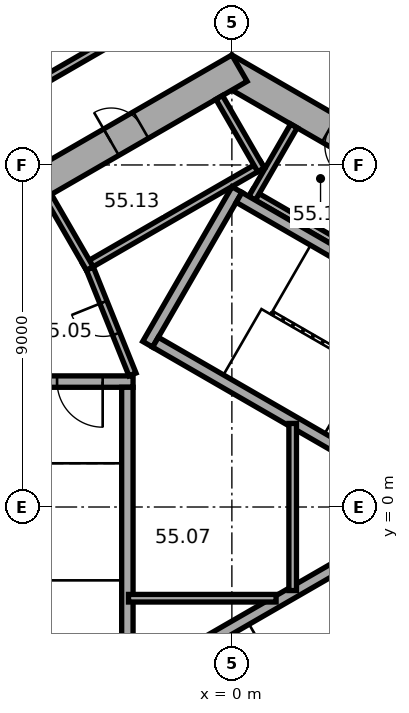
"""IFC4 building model, lengths in metres.
Left out: names, types, materials, properties, quantities, classifications, styles, units other than length and angle.
Written with IfcOpenShell. Run it as: python <this file> out.ifc"""

import sys

from ifc_helpers import new_model, si_unit, direction, frame, frame_2d, origin, place, context, subcontext, project, spatial, rectangle, extrude, element, fill, save


model = new_model("IFC4")
c1 = context("Model", 3, precision=1e-05, world=origin(), true_north=direction((0.0, 1.0)))
c2 = subcontext(c1, "Body", "Model", "MODEL_VIEW")
j1 = project(units=[si_unit("LENGTHUNIT", "METRE"), si_unit("PLANEANGLEUNIT", "RADIAN")], contexts=[c1])
p1 = place(None, origin())
s1 = spatial("IfcSite", under=j1, at=p1, CompositionType="ELEMENT")
p2 = place(p1, origin())
s2 = spatial("IfcBuilding", under=s1, at=p2, CompositionType="ELEMENT")
p3 = place(p2, frame((0.0, 0.0, 225.4)))
s3 = spatial("IfcBuildingStorey", under=s2, at=p3, CompositionType="ELEMENT", Elevation=225.4)
p4 = place(p3, frame((10.1, 5.6, 0.0), z_axis=(0.0, 0.0, 1.0), x_axis=(-0.866023897231, 0.500002609418, 0.0)))
e1 = element("IfcWall", 1, at=p4, inside=s3, PredefinedType="SHEAR", context=c2, shape_type="SweptSolid", body=[
    extrude(rectangle(XDim=11.894, YDim=0.8, at=frame_2d((5.947, 0.0))), origin(), (0.0, 0.0, 1.0), 3.7),
])
p5 = place(p4, frame((3.897, 0.0, 0.0)))
e2 = element("IfcOpeningElement", 2, at=p5, cuts=e1, PredefinedType="OPENING", context=c2, shape_type="SweptSolid", body=[
    extrude(rectangle(XDim=0.9, YDim=2.1, at=frame_2d((0.45, 1.05))), frame((0.0, 0.41, 0.0), z_axis=(0.0, -1.0, 0.0), x_axis=(1.0, 0.0, 0.0)), (0.0, 0.0, 1.0), 0.82),
])
p6 = place(p4, frame((7.797, 0.0, 0.0)))
e3 = element("IfcOpeningElement", 3, at=p6, cuts=e1, PredefinedType="OPENING", context=c2, shape_type="SweptSolid", body=[
    extrude(rectangle(XDim=0.9, YDim=2.1, at=frame_2d((0.45, 1.05))), frame((0.0, 0.41, 0.0), z_axis=(0.0, -1.0, 0.0), x_axis=(1.0, 0.0, 0.0)), (0.0, 0.0, 1.0), 0.82),
])
p7 = place(p3, frame((0.2, 11.547, 0.0), z_axis=(0.0, 0.0, 1.0), x_axis=(-0.866023897231, -0.500002609418, 0.0)))
e4 = element("IfcWall", 4, at=p7, inside=s3, PredefinedType="SHEAR", context=c2, shape_type="SweptSolid", body=[
    extrude(rectangle(XDim=11.894, YDim=0.8, at=frame_2d((5.947, 0.0))), origin(), (0.0, 0.0, 1.0), 3.7),
])
p8 = place(p7, frame((6.147, 0.0, 0.0)))
e5 = element("IfcOpeningElement", 5, at=p8, cuts=e4, PredefinedType="OPENING", context=c2, shape_type="SweptSolid", body=[
    extrude(rectangle(XDim=1.5, YDim=2.1, at=frame_2d((0.75, 1.05))), frame((0.0, 0.41, 0.0), z_axis=(0.0, -1.0, 0.0), x_axis=(1.0, 0.0, 0.0)), (0.0, 0.0, 1.0), 0.82),
])
p9 = place(p7, frame((2.997, 0.0, 0.0)))
e6 = element("IfcOpeningElement", 6, at=p9, cuts=e4, PredefinedType="OPENING", context=c2, shape_type="SweptSolid", body=[
    extrude(rectangle(XDim=0.9, YDim=2.1, at=frame_2d((0.45, 1.05))), frame((0.0, 0.41, 0.0), z_axis=(0.0, -1.0, 0.0), x_axis=(1.0, 0.0, 0.0)), (0.0, 0.0, 1.0), 0.82),
])
p10 = place(p3, frame((7.424, 4.259, 0.0), z_axis=(0.0, 0.0, 1.0), x_axis=(-0.866026010844, 0.49999894854, 0.0)))
e7 = element("IfcWall", 7, at=p10, inside=s3, PredefinedType="PARTITIONING", context=c2, shape_type="SweptSolid", body=[
    extrude(rectangle(XDim=8.0, YDim=0.2, at=frame_2d((4.0, 0.0))), origin(), (0.0, 0.0, 1.0), 3.42),
])
p11 = place(p3, frame((0.532, 8.122, 0.0), z_axis=(0.0, 0.0, 1.0), x_axis=(0.500077893725, 0.86598042715, 0.0)))
e8 = element("IfcWall", 8, at=p11, inside=s3, PredefinedType="PARTITIONING", context=c2, shape_type="SweptSolid", body=[
    extrude(rectangle(XDim=2.2, YDim=0.2, at=frame_2d((1.1, 0.0))), origin(), (0.0, 0.0, 1.0), 3.42),
])
p12 = place(p3, frame((0.803, 9.009, 0.0), z_axis=(0.0, 0.0, 1.0), x_axis=(-0.866028230842, -0.499995103361, 0.0)))
e9 = element("IfcWall", 9, at=p12, inside=s3, PredefinedType="PARTITIONING", context=c2, shape_type="SweptSolid", body=[
    extrude(rectangle(XDim=5.4, YDim=0.2, at=frame_2d((2.7, 0.0))), origin(), (0.0, 0.0, 1.0), 3.42),
])
p13 = place(p3, frame((0.767, 8.872, 0.0), z_axis=(0.0, 0.0, 1.0), x_axis=(-0.499994660107, 0.866028486751, 0.0)))
e10 = element("IfcWall", 10, at=p13, inside=s3, PredefinedType="PARTITIONING", context=c2, shape_type="SweptSolid", body=[
    extrude(rectangle(XDim=2.2, YDim=0.2, at=frame_2d((1.1, 0.0))), origin(), (0.0, 0.0, 1.0), 3.42),
])
p14 = place(p3, frame((-3.737, 6.272, 0.0), z_axis=(0.0, 0.0, 1.0), x_axis=(-0.50002983664, 0.866008176907, 0.0)))
e11 = element("IfcWall", 11, at=p14, inside=s3, PredefinedType="PARTITIONING", context=c2, shape_type="SweptSolid", body=[
    extrude(rectangle(XDim=2.2, YDim=0.2, at=frame_2d((1.1, 0.0))), origin(), (0.0, 0.0, 1.0), 3.42),
])
p15 = place(p3, frame((-2.216, 4.282, 0.0), z_axis=(0.0, 0.0, 1.0), x_axis=(0.499977259774, 0.866038532462, 0.0)))
e12 = element("IfcWall", 12, at=p15, inside=s3, PredefinedType="SHEAR", context=c2, shape_type="SweptSolid", body=[
    extrude(rectangle(XDim=4.7, YDim=0.3, at=frame_2d((2.35, 0.0))), origin(), (0.0, 0.0, 1.0), 3.42),
])
for number, where, z_axis, x_axis in (
    (13, (4.103, 0.807, 0.0), (0.0, 0.0, 1.0), (-0.866, 0.5, 0.0)),
    (14, (6.303, 4.617, 0.0), (0.0, 0.0, 1.0), (-0.866, 0.5, 0.0)),
):
    element("IfcWall", number, at=place(p3, frame(where, z_axis=z_axis, x_axis=x_axis)), inside=s3, PredefinedType="SHEAR", context=c2, shape_type="SweptSolid", body=[
        extrude(rectangle(XDim=7.06, YDim=0.3, at=frame_2d((3.53, 0.0))), origin(), (0.0, 0.0, 1.0), 3.42),
    ])
p16 = place(p3, frame((-2.6, 3.3, 0.0), z_axis=(0.0, 0.0, 1.0), x_axis=(-1.0, 0.0, 0.0)))
e15 = element("IfcWall", 15, at=p16, inside=s3, PredefinedType="SHEAR", context=c2, shape_type="SweptSolid", body=[
    extrude(rectangle(XDim=4.7, YDim=0.3, at=frame_2d((2.35, 0.0))), origin(), (0.0, 0.0, 1.0), 3.42),
])
p17 = place(p16, frame((0.8, 0.0, 0.0)))
e16 = element("IfcOpeningElement", 16, at=p17, cuts=e15, PredefinedType="OPENING", context=c2, shape_type="SweptSolid", body=[
    extrude(rectangle(XDim=1.2, YDim=2.1, at=frame_2d((0.6, 1.05))), frame((0.0, 0.16, 0.0), z_axis=(0.0, -1.0, 0.0), x_axis=(1.0, 0.0, 0.0)), (0.0, 0.0, 1.0), 0.32),
])
p18 = place(p3, frame((-2.75, 3.15, 0.0), z_axis=(0.0, 0.0, 1.0), x_axis=(0.0, -1.0, 0.0)))
e17 = element("IfcWall", 17, at=p18, inside=s3, PredefinedType="SHEAR", context=c2, shape_type="SweptSolid", body=[
    extrude(rectangle(XDim=7.06, YDim=0.3, at=frame_2d((3.53, 0.0))), origin(), (0.0, 0.0, 1.0), 3.42),
])
p19 = place(p3, frame((-1.353, -3.957, 0.0), z_axis=(0.0, 0.0, 1.0), x_axis=(0.866027801685, 0.499995846692, 0.0)))
e18 = element("IfcWall", 18, at=p19, inside=s3, PredefinedType="SHEAR", context=c2, shape_type="SweptSolid", body=[
    extrude(rectangle(XDim=7.06, YDim=0.3, at=frame_2d((3.53, 0.0))), origin(), (0.0, 0.0, 1.0), 3.42),
])
p20 = place(p3, frame((-2.615, 3.487, 0.0), z_axis=(0.0, 0.0, 1.0), x_axis=(-0.373576831041, 0.92759924068, 0.0)))
e19 = element("IfcWall", 19, at=p20, inside=s3, PredefinedType="PARTITIONING", context=c2, shape_type="SweptSolid", body=[
    extrude(rectangle(XDim=3.002, YDim=0.2, at=frame_2d((1.501, 0.0))), origin(), (0.0, 0.0, 1.0), 3.42),
])
p21 = place(p20, frame((1.15, 0.0, 0.0)))
e20 = element("IfcOpeningElement", 20, at=p21, cuts=e19, PredefinedType="OPENING", context=c2, shape_type="SweptSolid", body=[
    extrude(rectangle(XDim=0.9, YDim=2.1, at=frame_2d((0.45, 1.05))), frame((0.0, 0.11, 0.0), z_axis=(0.0, -1.0, 0.0), x_axis=(1.0, 0.0, 0.0)), (0.0, 0.0, 1.0), 0.22),
])
p22 = place(p3, frame((-2.72, -2.4, 0.0), z_axis=(0.0, 0.0, 1.0), x_axis=(1.0, 0.0, 0.0)))
e21 = element("IfcWall", 21, at=p22, inside=s3, PredefinedType="PARTITIONING", context=c2, shape_type="SweptSolid", body=[
    extrude(rectangle(XDim=3.883, YDim=0.2, at=frame_2d((1.941, 0.0))), origin(), (0.0, 0.0, 1.0), 3.42),
])
p23 = place(p3, frame((1.6, -2.198, 0.0), z_axis=(0.0, 0.0, 1.0), x_axis=(0.0, 1.0, 0.0)))
e22 = element("IfcWall", 22, at=p23, inside=s3, PredefinedType="PARTITIONING", context=c2, shape_type="SweptSolid", body=[
    extrude(rectangle(XDim=4.397, YDim=0.2, at=frame_2d((2.198, 0.0))), origin(), (0.0, 0.0, 1.0), 3.42),
])
p24 = place(p3, frame((-1.167, 13.414, 0.0), z_axis=(0.0, 0.0, 1.0), x_axis=(-0.866023347809, -0.500003561037, 0.0)))
e23 = element("IfcWall", 23, at=p24, inside=s3, PredefinedType="PARTITIONING", context=c2, shape_type="SweptSolid", body=[
    extrude(rectangle(XDim=4.661, YDim=0.2, at=frame_2d((2.331, 0.0))), origin(), (0.0, 0.0, 1.0), 3.42),
])
p25 = place(p3, frame((8.721, 9.052, 0.0), z_axis=(0.0, 0.0, 1.0), x_axis=(-0.866028125821, 0.499995285264, 0.0)))
e24 = element("IfcWall", 24, at=p25, inside=s3, PredefinedType="PARTITIONING", context=c2, shape_type="SweptSolid", body=[
    extrude(rectangle(XDim=8.934, YDim=0.2, at=frame_2d((4.467, 0.0))), origin(), (0.0, 0.0, 1.0), 3.42),
])
p26 = place(p25, frame((5.05, 0.0, 0.0)))
e25 = element("IfcOpeningElement", 25, at=p26, cuts=e24, PredefinedType="OPENING", context=c2, shape_type="SweptSolid", body=[
    extrude(rectangle(XDim=1.0, YDim=2.1, at=frame_2d((0.5, 1.05))), frame((0.0, 0.11, 0.0), z_axis=(0.0, -1.0, 0.0), x_axis=(1.0, 0.0, 0.0)), (0.0, 0.0, 1.0), 0.22),
])
p27 = place(p17, origin())
e26 = element("IfcDoor", 26, at=p27, inside=s3, OperationType="SINGLE_SWING_RIGHT", PredefinedType="DOOR", context=c2, shape_type="SweptSolid", body=[
    extrude(rectangle(XDim=1.2, YDim=2.1, at=frame_2d((0.6, 1.05))), frame((0.0, 0.025, 0.0), z_axis=(0.0, -1.0, 0.0), x_axis=(1.0, 0.0, 0.0)), (0.0, 0.0, 1.0), 0.05),
])
fill(e16, e26)
p28 = place(p21, origin())
e27 = element("IfcDoor", 27, at=p28, inside=s3, OperationType="SINGLE_SWING_LEFT", PredefinedType="DOOR", context=c2, shape_type="SweptSolid", body=[
    extrude(rectangle(XDim=0.9, YDim=2.1, at=frame_2d((0.45, 1.05))), frame((0.0, 0.025, 0.0), z_axis=(0.0, -1.0, 0.0), x_axis=(1.0, 0.0, 0.0)), (0.0, 0.0, 1.0), 0.05),
])
fill(e20, e27)
p29 = place(p9, origin())
e28 = element("IfcDoor", 28, at=p29, inside=s3, OperationType="SINGLE_SWING_LEFT", PredefinedType="DOOR", context=c2, shape_type="SweptSolid", body=[
    extrude(rectangle(XDim=0.9, YDim=2.1, at=frame_2d((0.45, 1.05))), frame((0.0, 0.025, 0.0), z_axis=(0.0, -1.0, 0.0), x_axis=(1.0, 0.0, 0.0)), (0.0, 0.0, 1.0), 0.05),
])
fill(e6, e28)
save(model, sys.argv[1])
